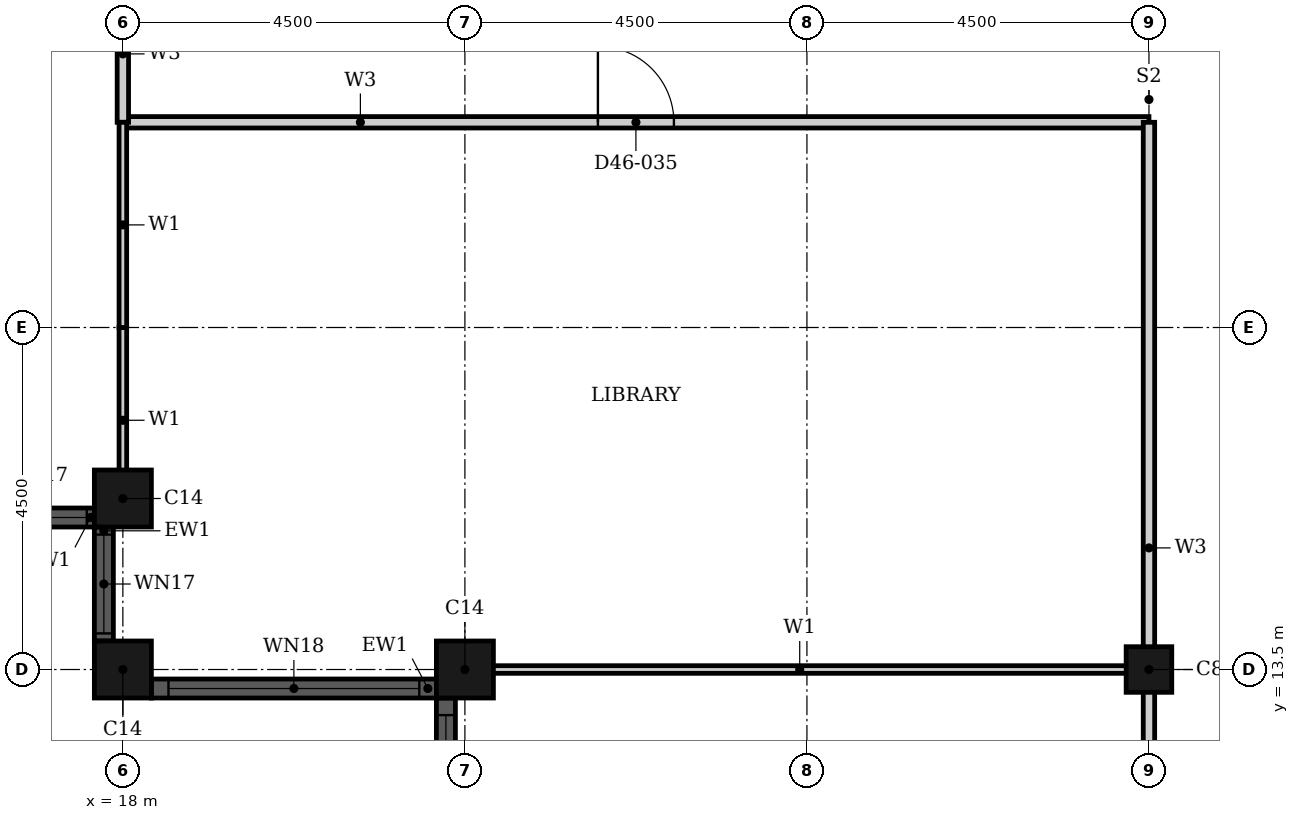
"""IFC4 building model, lengths in metres.
Left out: names, types, materials, properties, quantities, classifications, styles, units other than length and angle.
Written with IfcOpenShell. Run it as: python <this file> out.ifc"""

import sys

from ifc_helpers import new_model, si_unit, direction, frame, frame_2d, origin, origin_2d, place, context, subcontext, project, spatial, rectangle, hollow_rectangle, extrude, element, fill, save


model = new_model("IFC4")
c1 = context("Model", 3, precision=1e-05, world=origin(), true_north=direction((0.0, 1.0)))
c2 = subcontext(c1, "Body", "Model", "MODEL_VIEW")
j1 = project(units=[si_unit("LENGTHUNIT", "METRE"), si_unit("PLANEANGLEUNIT", "RADIAN")], contexts=[c1])
p1 = place(None, origin())
s1 = spatial("IfcSite", under=j1, at=p1, CompositionType="ELEMENT")
p2 = place(p1, origin())
s2 = spatial("IfcBuilding", under=s1, at=p2, CompositionType="ELEMENT")
p3 = place(p2, frame((0.0, 0.0, 183.9)))
s3 = spatial("IfcBuildingStorey", under=s2, at=p3, CompositionType="ELEMENT", Elevation=183.9)
for number, where, z_axis, x_axis in (
    (1, (18.0, 15.75, 0.0), (0.0, 0.0, 1.0), (1.0, 0.0, 0.0)),
    (2, (18.0, 13.5, 0.0), (0.0, 0.0, 1.0), (1.0, 0.0, 0.0)),
    (3, (22.5, 13.5, 0.0), (0.0, 0.0, 1.0), (1.0, 0.0, 0.0)),
):
    element("IfcColumn", number, at=place(p3, frame(where, z_axis=z_axis, x_axis=x_axis)), inside=s3, PredefinedType="COLUMN", context=c2, shape_type="SweptSolid", body=[
        extrude(hollow_rectangle(XDim=0.75, YDim=0.75, WallThickness=0.024, at=origin_2d()), origin(), (0.0, 0.0, 1.0), 3.7),
    ])
p4 = place(p3, frame((31.5, 13.5, 0.0), z_axis=(0.0, 0.0, 1.0), x_axis=(1.0, 0.0, 0.0)))
e4 = element("IfcColumn", 4, at=p4, inside=s3, PredefinedType="COLUMN", context=c2, shape_type="SweptSolid", body=[
    extrude(hollow_rectangle(XDim=0.6, YDim=0.6, WallThickness=0.02, at=origin_2d()), origin(), (0.0, 0.0, 1.0), 3.7),
])
p5 = place(p3, frame((16.125, 15.5, 0.0), z_axis=(0.0, 0.0, 1.0), x_axis=(1.0, 0.0, 0.0)))
e5 = element("IfcWall", 5, at=p5, inside=s3, PredefinedType="SOLIDWALL", context=c2, shape_type="SweptSolid", body=[
    extrude(rectangle(XDim=1.5, YDim=0.25, at=frame_2d((0.75, 0.0))), origin(), (0.0, 0.0, 1.0), 3.7),
])
p6 = place(p5, frame((0.1, 0.0, 0.9)))
e6 = element("IfcOpeningElement", 6, at=p6, cuts=e5, PredefinedType="OPENING", context=c2, shape_type="SweptSolid", body=[
    extrude(rectangle(XDim=1.3, YDim=1.95, at=frame_2d((0.65, 0.975))), frame((0.0, 0.135, 0.0), z_axis=(0.0, -1.0, 0.0), x_axis=(1.0, 0.0, 0.0)), (0.0, 0.0, 1.0), 0.27),
])
p7 = place(p3, frame((17.75, 15.375, 0.0), z_axis=(0.0, 0.0, 1.0), x_axis=(0.0, -1.0, 0.0)))
e7 = element("IfcWall", 7, at=p7, inside=s3, PredefinedType="SOLIDWALL", context=c2, shape_type="SweptSolid", body=[
    extrude(rectangle(XDim=1.5, YDim=0.25, at=frame_2d((0.75, 0.0))), origin(), (0.0, 0.0, 1.0), 3.7),
])
p8 = place(p7, frame((0.1, 0.0, 0.9)))
e8 = element("IfcOpeningElement", 8, at=p8, cuts=e7, PredefinedType="OPENING", context=c2, shape_type="SweptSolid", body=[
    extrude(rectangle(XDim=1.3, YDim=1.95, at=frame_2d((0.65, 0.975))), frame((0.0, 0.135, 0.0), z_axis=(0.0, -1.0, 0.0), x_axis=(1.0, 0.0, 0.0)), (0.0, 0.0, 1.0), 0.27),
])
p9 = place(p3, frame((18.375, 13.25, 0.0), z_axis=(0.0, 0.0, 1.0), x_axis=(1.0, 0.0, 0.0)))
e9 = element("IfcWall", 9, at=p9, inside=s3, PredefinedType="SOLIDWALL", context=c2, shape_type="SweptSolid", body=[
    extrude(rectangle(XDim=3.75, YDim=0.25, at=frame_2d((1.875, 0.0))), origin(), (0.0, 0.0, 1.0), 3.7),
])
p10 = place(p9, frame((0.225, 0.0, 0.45)))
e10 = element("IfcOpeningElement", 10, at=p10, cuts=e9, PredefinedType="OPENING", context=c2, shape_type="SweptSolid", body=[
    extrude(rectangle(XDim=3.3, YDim=2.4, at=frame_2d((1.65, 1.2))), frame((0.0, 0.135, 0.0), z_axis=(0.0, -1.0, 0.0), x_axis=(1.0, 0.0, 0.0)), (0.0, 0.0, 1.0), 0.27),
])
p11 = place(p3, frame((22.25, 13.125, 0.0), z_axis=(0.0, 0.0, 1.0), x_axis=(0.0, -1.0, 0.0)))
e11 = element("IfcWall", 11, at=p11, inside=s3, PredefinedType="SOLIDWALL", context=c2, shape_type="SweptSolid", body=[
    extrude(rectangle(XDim=8.25, YDim=0.25, at=frame_2d((4.125, 0.0))), origin(), (0.0, 0.0, 1.0), 3.7),
])
p12 = place(p11, frame((0.225, 0.0, 0.45)))
e12 = element("IfcOpeningElement", 12, at=p12, cuts=e11, PredefinedType="OPENING", context=c2, shape_type="SweptSolid", body=[
    extrude(rectangle(XDim=3.3, YDim=2.4, at=frame_2d((1.65, 1.2))), frame((0.0, 0.135, 0.0), z_axis=(0.0, -1.0, 0.0), x_axis=(1.0, 0.0, 0.0)), (0.0, 0.0, 1.0), 0.27),
])
p13 = place(p11, frame((4.725, 0.0, 0.45)))
e13 = element("IfcOpeningElement", 13, at=p13, cuts=e11, PredefinedType="OPENING", context=c2, shape_type="SweptSolid", body=[
    extrude(rectangle(XDim=3.3, YDim=2.4, at=frame_2d((1.65, 1.2))), frame((0.0, 0.135, 0.0), z_axis=(0.0, -1.0, 0.0), x_axis=(1.0, 0.0, 0.0)), (0.0, 0.0, 1.0), 0.27),
])
p14 = place(p3, frame((18.0, 20.7, 0.0), z_axis=(0.0, 0.0, 1.0), x_axis=(1.0, 0.0, 0.0)))
e14 = element("IfcWall", 14, at=p14, inside=s3, PredefinedType="PARTITIONING", context=c2, shape_type="SweptSolid", body=[
    extrude(rectangle(XDim=13.5, YDim=0.15, at=frame_2d((6.75, 0.0))), origin(), (0.0, 0.0, 1.0), 3.3),
])
p15 = place(p14, frame((6.25, 0.0, 0.0)))
e15 = element("IfcOpeningElement", 15, at=p15, cuts=e14, PredefinedType="OPENING", context=c2, shape_type="SweptSolid", body=[
    extrude(rectangle(XDim=1.0, YDim=2.1, at=frame_2d((0.5, 1.05))), frame((0.0, 0.085, 0.0), z_axis=(0.0, -1.0, 0.0), x_axis=(1.0, 0.0, 0.0)), (0.0, 0.0, 1.0), 0.17),
])
p16 = place(p3, frame((18.0, 20.7, 0.0), z_axis=(0.0, 0.0, 1.0), x_axis=(0.0, 1.0, 0.0)))
e16 = element("IfcWall", 16, at=p16, inside=s3, PredefinedType="PARTITIONING", context=c2, shape_type="SweptSolid", body=[
    extrude(rectangle(XDim=1.8, YDim=0.15, at=frame_2d((0.9, 0.0))), origin(), (0.0, 0.0, 1.0), 3.3),
])
p17 = place(p3, frame((31.5, 4.5, 0.0), z_axis=(0.0, 0.0, 1.0), x_axis=(0.0, 1.0, 0.0)))
e17 = element("IfcWall", 17, at=p17, inside=s3, PredefinedType="PARTITIONING", context=c2, shape_type="SweptSolid", body=[
    extrude(rectangle(XDim=16.2, YDim=0.15, at=frame_2d((8.1, 0.0))), origin(), (0.0, 0.0, 1.0), 2.58),
])
p18 = place(p17, frame((4.0, 0.0, 0.0)))
e18 = element("IfcOpeningElement", 18, at=p18, cuts=e17, PredefinedType="OPENING", context=c2, shape_type="SweptSolid", body=[
    extrude(rectangle(XDim=1.0, YDim=2.1, at=frame_2d((0.5, 1.05))), frame((0.0, 0.085, 0.0), z_axis=(0.0, -1.0, 0.0), x_axis=(1.0, 0.0, 0.0)), (0.0, 0.0, 1.0), 0.17),
])
p19 = place(p3, frame((22.31, 13.5, 0.0), z_axis=(0.0, 0.0, 1.0), x_axis=(1.0, 0.0, 0.0)))
e19 = element("IfcWall", 19, at=p19, inside=s3, PredefinedType="PARTITIONING", context=c2, shape_type="SweptSolid", body=[
    extrude(rectangle(XDim=9.19, YDim=0.1, at=frame_2d((4.595, 0.0))), origin(), (0.0, 0.0, 1.0), 2.38),
])
p20 = place(p3, frame((18.0, 15.56, 0.0), z_axis=(0.0, 0.0, 1.0), x_axis=(0.0, 1.0, 0.0)))
e20 = element("IfcWall", 20, at=p20, inside=s3, PredefinedType="PARTITIONING", context=c2, shape_type="SweptSolid", body=[
    extrude(rectangle(XDim=2.439, YDim=0.1, at=frame_2d((1.219, 0.0))), origin(), (0.0, 0.0, 1.0), 3.3),
])
p21 = place(p3, frame((18.0, 18.0, 0.0), z_axis=(0.0, 0.0, 1.0), x_axis=(0.0, 1.0, 0.0)))
e21 = element("IfcWall", 21, at=p21, inside=s3, PredefinedType="PARTITIONING", context=c2, shape_type="SweptSolid", body=[
    extrude(rectangle(XDim=2.7, YDim=0.1, at=frame_2d((1.35, 0.0))), origin(), (0.0, 0.0, 1.0), 3.3),
])
p22 = place(p6, origin())
e22 = element("IfcWindow", 22, at=p22, inside=s3, PartitioningType="SINGLE_PANEL", PredefinedType="WINDOW", context=c2, shape_type="SweptSolid", body=[
    extrude(rectangle(XDim=1.3, YDim=1.95, at=frame_2d((0.65, 0.975))), frame((0.0, 0.03, 0.0), z_axis=(0.0, -1.0, 0.0), x_axis=(1.0, 0.0, 0.0)), (0.0, 0.0, 1.0), 0.06),
])
fill(e6, e22)
p23 = place(p8, origin())
e23 = element("IfcWindow", 23, at=p23, inside=s3, PartitioningType="SINGLE_PANEL", PredefinedType="WINDOW", context=c2, shape_type="SweptSolid", body=[
    extrude(rectangle(XDim=1.3, YDim=1.95, at=frame_2d((0.65, 0.975))), frame((0.0, 0.03, 0.0), z_axis=(0.0, -1.0, 0.0), x_axis=(1.0, 0.0, 0.0)), (0.0, 0.0, 1.0), 0.06),
])
fill(e8, e23)
p24 = place(p10, origin())
e24 = element("IfcWindow", 24, at=p24, inside=s3, PartitioningType="SINGLE_PANEL", PredefinedType="WINDOW", context=c2, shape_type="SweptSolid", body=[
    extrude(rectangle(XDim=3.3, YDim=2.4, at=frame_2d((1.65, 1.2))), frame((0.0, 0.03, 0.0), z_axis=(0.0, -1.0, 0.0), x_axis=(1.0, 0.0, 0.0)), (0.0, 0.0, 1.0), 0.06),
])
fill(e10, e24)
p25 = place(p12, origin())
e25 = element("IfcWindow", 25, at=p25, inside=s3, PartitioningType="SINGLE_PANEL", PredefinedType="WINDOW", context=c2, shape_type="SweptSolid", body=[
    extrude(rectangle(XDim=3.3, YDim=2.4, at=frame_2d((1.65, 1.2))), frame((0.0, 0.03, 0.0), z_axis=(0.0, -1.0, 0.0), x_axis=(1.0, 0.0, 0.0)), (0.0, 0.0, 1.0), 0.06),
])
fill(e12, e25)
p26 = place(p15, origin())
e26 = element("IfcDoor", 26, at=p26, inside=s3, OperationType="SINGLE_SWING_LEFT", PredefinedType="DOOR", context=c2, shape_type="SweptSolid", body=[
    extrude(rectangle(XDim=1.0, YDim=2.1, at=frame_2d((0.5, 1.05))), frame((0.0, 0.025, 0.0), z_axis=(0.0, -1.0, 0.0), x_axis=(1.0, 0.0, 0.0)), (0.0, 0.0, 1.0), 0.05),
])
fill(e15, e26)
save(model, sys.argv[1])
